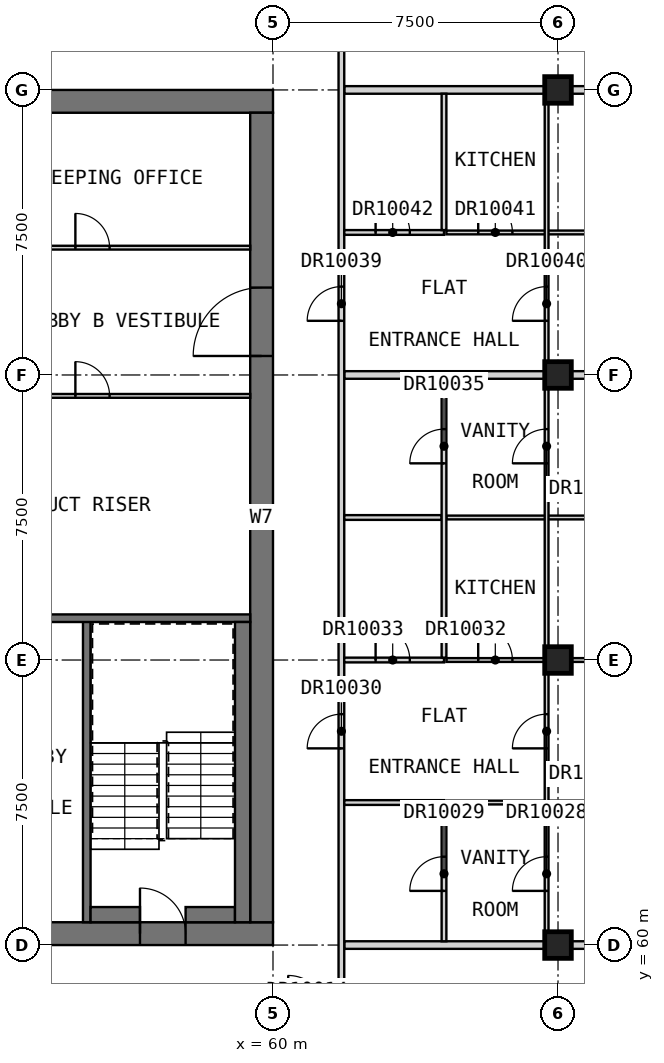
"""IFC4 building model, lengths in metres.
Left out: names, types, materials, properties, quantities, classifications, styles, units other than length and angle.
Written with IfcOpenShell. Run it as: python <this file> out.ifc"""

import sys

from ifc_helpers import new_model, si_unit, direction, frame, frame_2d, origin, origin_2d, place, context, subcontext, project, spatial, rectangle, extrude, element, fill, save


model = new_model("IFC4")
c1 = context("Model", 3, precision=1e-05, world=origin(), true_north=direction((0.0, 1.0)))
c2 = subcontext(c1, "Body", "Model", "MODEL_VIEW")
j1 = project(units=[si_unit("LENGTHUNIT", "METRE"), si_unit("PLANEANGLEUNIT", "RADIAN")], contexts=[c1])
p1 = place(None, origin())
s1 = spatial("IfcSite", under=j1, at=p1, CompositionType="ELEMENT")
p2 = place(p1, origin())
s2 = spatial("IfcBuilding", under=s1, at=p2, CompositionType="ELEMENT")
p3 = place(p2, frame((0.0, 0.0, 273.2)))
s3 = spatial("IfcBuildingStorey", under=s2, at=p3, CompositionType="ELEMENT", Elevation=273.2)
for number, where, z_axis, x_axis in (
    (1, (67.5, 60.0, 0.0), (0.0, 0.0, 1.0), (1.0, 0.0, 0.0)),
    (2, (67.5, 67.5, 0.0), (0.0, 0.0, 1.0), (1.0, 0.0, 0.0)),
    (3, (67.5, 75.0, 0.0), (0.0, 0.0, 1.0), (1.0, 0.0, 0.0)),
    (4, (67.5, 82.5, 0.0), (0.0, 0.0, 1.0), (1.0, 0.0, 0.0)),
):
    element("IfcColumn", number, at=place(p3, frame(where, z_axis=z_axis, x_axis=x_axis)), inside=s3, PredefinedType="COLUMN", context=c2, shape_type="SweptSolid", body=[
        extrude(rectangle(XDim=0.7, YDim=0.7, at=origin_2d()), origin(), (0.0, 0.0, 1.0), 3.5),
    ])
p4 = place(p3, frame((30.0, 60.3, 0.0), z_axis=(0.0, 0.0, 1.0), x_axis=(1.0, 0.0, 0.0)))
e5 = element("IfcWall", 5, at=p4, inside=s3, PredefinedType="SHEAR", context=c2, shape_type="SweptSolid", body=[
    extrude(rectangle(XDim=30.0, YDim=0.6, at=frame_2d((15.0, 0.0))), origin(), (0.0, 0.0, 1.0), 3.5),
])
p5 = place(p4, frame((21.9, 0.0, 0.0)))
e6 = element("IfcOpeningElement", 6, at=p5, cuts=e5, PredefinedType="OPENING", context=c2, shape_type="SweptSolid", body=[
    extrude(rectangle(XDim=1.8, YDim=2.1, at=frame_2d((0.9, 1.05))), frame((0.0, 0.31, 0.0), z_axis=(0.0, -1.0, 0.0), x_axis=(1.0, 0.0, 0.0)), (0.0, 0.0, 1.0), 0.62),
])
p6 = place(p4, frame((26.5, 0.0, 0.0)))
e7 = element("IfcOpeningElement", 7, at=p6, cuts=e5, PredefinedType="OPENING", context=c2, shape_type="SweptSolid", body=[
    extrude(rectangle(XDim=1.2, YDim=2.1, at=frame_2d((0.6, 1.05))), frame((0.0, 0.31, 0.0), z_axis=(0.0, -1.0, 0.0), x_axis=(1.0, 0.0, 0.0)), (0.0, 0.0, 1.0), 0.62),
])
p7 = place(p3, frame((30.0, 82.2, 0.0), z_axis=(0.0, 0.0, 1.0), x_axis=(1.0, 0.0, 0.0)))
e8 = element("IfcWall", 8, at=p7, inside=s3, PredefinedType="SHEAR", context=c2, shape_type="SweptSolid", body=[
    extrude(rectangle(XDim=30.0, YDim=0.6, at=frame_2d((15.0, 0.0))), origin(), (0.0, 0.0, 1.0), 3.5),
])
p8 = place(p3, frame((59.7, 60.6, 0.0), z_axis=(0.0, 0.0, 1.0), x_axis=(0.0, 1.0, 0.0)))
e9 = element("IfcWall", 9, at=p8, inside=s3, PredefinedType="SHEAR", context=c2, shape_type="SweptSolid", body=[
    extrude(rectangle(XDim=21.3, YDim=0.6, at=frame_2d((10.65, 0.0))), origin(), (0.0, 0.0, 1.0), 3.5),
])
p9 = place(p8, frame((14.9, 0.0, 0.0)))
e10 = element("IfcOpeningElement", 10, at=p9, cuts=e9, PredefinedType="OPENING", context=c2, shape_type="SweptSolid", body=[
    extrude(rectangle(XDim=1.8, YDim=2.1, at=frame_2d((0.9, 1.05))), frame((0.0, 0.31, 0.0), z_axis=(0.0, -1.0, 0.0), x_axis=(1.0, 0.0, 0.0)), (0.0, 0.0, 1.0), 0.62),
])
p10 = place(p3, frame((55.1, 60.6, 0.0), z_axis=(0.0, 0.0, 1.0), x_axis=(0.0, 1.0, 0.0)))
e11 = element("IfcWall", 11, at=p10, inside=s3, PredefinedType="SOLIDWALL", context=c2, shape_type="SweptSolid", body=[
    extrude(rectangle(XDim=8.0, YDim=0.2, at=frame_2d((4.0, 0.0))), origin(), (0.0, 0.0, 1.0), 3.25),
])
p11 = place(p3, frame((51.1, 68.6, 0.0), z_axis=(0.0, 0.0, 1.0), x_axis=(1.0, 0.0, 0.0)))
e12 = element("IfcWall", 12, at=p11, inside=s3, PredefinedType="SOLIDWALL", context=c2, shape_type="SweptSolid", body=[
    extrude(rectangle(XDim=8.3, YDim=0.2, at=frame_2d((4.15, 0.0))), origin(), (0.0, 0.0, 1.0), 3.25),
])
for number, where, z_axis, x_axis in (
    (13, (55.2, 60.8, 0.0), (0.0, 0.0, 1.0), (1.0, 0.0, 0.0)),
    (14, (57.7, 60.8, 0.0), (0.0, 0.0, 1.0), (1.0, 0.0, 0.0)),
):
    element("IfcWall", number, at=place(p3, frame(where, z_axis=z_axis, x_axis=x_axis)), inside=s3, PredefinedType="SOLIDWALL", context=c2, shape_type="SweptSolid", body=[
        extrude(rectangle(XDim=1.3, YDim=0.4, at=frame_2d((0.65, 0.0))), origin(), (0.0, 0.0, 1.0), 3.25),
    ])
p12 = place(p3, frame((59.2, 60.6, 0.0), z_axis=(0.0, 0.0, 1.0), x_axis=(0.0, 1.0, 0.0)))
e15 = element("IfcWall", 15, at=p12, inside=s3, PredefinedType="SOLIDWALL", context=c2, shape_type="SweptSolid", body=[
    extrude(rectangle(XDim=7.9, YDim=0.4, at=frame_2d((3.95, 0.0))), origin(), (0.0, 0.0, 1.0), 3.25),
])
p13 = place(p3, frame((51.1, 74.45, 0.0), z_axis=(0.0, 0.0, 1.0), x_axis=(1.0, 0.0, 0.0)))
e16 = element("IfcWall", 16, at=p13, inside=s3, PredefinedType="PARTITIONING", context=c2, shape_type="SweptSolid", body=[
    extrude(rectangle(XDim=8.3, YDim=0.1, at=frame_2d((4.15, 0.0))), origin(), (0.0, 0.0, 1.0), 3.25),
])
p14 = place(p13, frame((3.7, 0.0, 0.0)))
e17 = element("IfcOpeningElement", 17, at=p14, cuts=e16, PredefinedType="OPENING", context=c2, shape_type="SweptSolid", body=[
    extrude(rectangle(XDim=0.9, YDim=2.1, at=frame_2d((0.45, 1.05))), frame((0.0, 0.06, 0.0), z_axis=(0.0, -1.0, 0.0), x_axis=(1.0, 0.0, 0.0)), (0.0, 0.0, 1.0), 0.12),
])
p15 = place(p3, frame((51.1, 78.35, 0.0), z_axis=(0.0, 0.0, 1.0), x_axis=(1.0, 0.0, 0.0)))
e18 = element("IfcWall", 18, at=p15, inside=s3, PredefinedType="PARTITIONING", context=c2, shape_type="SweptSolid", body=[
    extrude(rectangle(XDim=8.3, YDim=0.1, at=frame_2d((4.15, 0.0))), origin(), (0.0, 0.0, 1.0), 3.25),
])
p16 = place(p15, frame((3.7, 0.0, 0.0)))
e19 = element("IfcOpeningElement", 19, at=p16, cuts=e18, PredefinedType="OPENING", context=c2, shape_type="SweptSolid", body=[
    extrude(rectangle(XDim=0.9, YDim=2.1, at=frame_2d((0.45, 1.05))), frame((0.0, 0.06, 0.0), z_axis=(0.0, -1.0, 0.0), x_axis=(1.0, 0.0, 0.0)), (0.0, 0.0, 1.0), 0.12),
])
for number, where, z_axis, x_axis in (
    (20, (61.875, 60.0, 0.0), (0.0, 0.0, 1.0), (1.0, 0.0, 0.0)),
    (21, (61.875, 75.0, 0.0), (0.0, 0.0, 1.0), (1.0, 0.0, 0.0)),
    (22, (61.875, 82.5, 0.0), (0.0, 0.0, 1.0), (1.0, 0.0, 0.0)),
):
    element("IfcWall", number, at=place(p3, frame(where, z_axis=z_axis, x_axis=x_axis)), inside=s3, PredefinedType="PARTITIONING", context=c2, shape_type="SweptSolid", body=[
        extrude(rectangle(XDim=13.125, YDim=0.2, at=frame_2d((6.562, 0.0))), origin(), (0.0, 0.0, 1.0), 3.25),
    ])
p17 = place(p3, frame((61.8, 58.275, 0.0), z_axis=(0.0, 0.0, 1.0), x_axis=(0.0, 1.0, 0.0)))
e23 = element("IfcWall", 23, at=p17, inside=s3, PredefinedType="PARTITIONING", context=c2, shape_type="SweptSolid", body=[
    extrude(rectangle(XDim=25.95, YDim=0.15, at=frame_2d((12.975, 0.0))), origin(), (0.0, 0.0, 1.0), 3.25),
])
p18 = place(p17, frame((6.9, 0.0, 0.0)))
e24 = element("IfcOpeningElement", 24, at=p18, cuts=e23, PredefinedType="OPENING", context=c2, shape_type="SweptSolid", body=[
    extrude(rectangle(XDim=0.9, YDim=2.1, at=frame_2d((0.45, 1.05))), frame((0.0, 0.085, 0.0), z_axis=(0.0, -1.0, 0.0), x_axis=(1.0, 0.0, 0.0)), (0.0, 0.0, 1.0), 0.17),
])
p19 = place(p17, frame((18.15, 0.0, 0.0)))
e25 = element("IfcOpeningElement", 25, at=p19, cuts=e23, PredefinedType="OPENING", context=c2, shape_type="SweptSolid", body=[
    extrude(rectangle(XDim=0.9, YDim=2.1, at=frame_2d((0.45, 1.05))), frame((0.0, 0.085, 0.0), z_axis=(0.0, -1.0, 0.0), x_axis=(1.0, 0.0, 0.0)), (0.0, 0.0, 1.0), 0.17),
])
p20 = place(p3, frame((64.562, 63.75, 0.0), z_axis=(0.0, 0.0, 1.0), x_axis=(1.0, 0.0, 0.0)))
e26 = element("IfcWall", 26, at=p20, inside=s3, PredefinedType="PARTITIONING", context=c2, shape_type="SweptSolid", body=[
    extrude(rectangle(XDim=9.627, YDim=0.1, at=frame_2d((4.814, 0.0))), origin(), (0.0, 0.0, 1.0), 3.25),
])
p21 = place(p20, frame((6.087, 0.0, 0.0)))
e27 = element("IfcOpeningElement", 27, at=p21, cuts=e26, PredefinedType="OPENING", context=c2, shape_type="SweptSolid", body=[
    extrude(rectangle(XDim=0.9, YDim=2.1, at=frame_2d((0.45, 1.05))), frame((0.0, 0.06, 0.0), z_axis=(0.0, -1.0, 0.0), x_axis=(1.0, 0.0, 0.0)), (0.0, 0.0, 1.0), 0.12),
])
p22 = place(p3, frame((64.562, 67.5, 0.0), z_axis=(0.0, 0.0, 1.0), x_axis=(1.0, 0.0, 0.0)))
e28 = element("IfcWall", 28, at=p22, inside=s3, PredefinedType="PARTITIONING", context=c2, shape_type="SweptSolid", body=[
    extrude(rectangle(XDim=10.438, YDim=0.1, at=frame_2d((5.219, 0.0))), origin(), (0.0, 0.0, 1.0), 3.25),
])
p23 = place(p22, frame((0.837, 0.0, 0.0)))
e29 = element("IfcOpeningElement", 29, at=p23, cuts=e28, PredefinedType="OPENING", context=c2, shape_type="SweptSolid", body=[
    extrude(rectangle(XDim=0.9, YDim=2.1, at=frame_2d((0.45, 1.05))), frame((0.0, 0.06, 0.0), z_axis=(0.0, -1.0, 0.0), x_axis=(1.0, 0.0, 0.0)), (0.0, 0.0, 1.0), 0.12),
])
p24 = place(p22, frame((6.087, 0.0, 0.0)))
e30 = element("IfcOpeningElement", 30, at=p24, cuts=e28, PredefinedType="OPENING", context=c2, shape_type="SweptSolid", body=[
    extrude(rectangle(XDim=0.9, YDim=2.1, at=frame_2d((0.45, 1.05))), frame((0.0, 0.06, 0.0), z_axis=(0.0, -1.0, 0.0), x_axis=(1.0, 0.0, 0.0)), (0.0, 0.0, 1.0), 0.12),
])
p25 = place(p3, frame((64.562, 71.25, 0.0), z_axis=(0.0, 0.0, 1.0), x_axis=(1.0, 0.0, 0.0)))
e31 = element("IfcWall", 31, at=p25, inside=s3, PredefinedType="PARTITIONING", context=c2, shape_type="SweptSolid", body=[
    extrude(rectangle(XDim=9.627, YDim=0.1, at=frame_2d((4.814, 0.0))), origin(), (0.0, 0.0, 1.0), 3.25),
])
p26 = place(p25, frame((6.087, 0.0, 0.0)))
e32 = element("IfcOpeningElement", 32, at=p26, cuts=e31, PredefinedType="OPENING", context=c2, shape_type="SweptSolid", body=[
    extrude(rectangle(XDim=0.9, YDim=2.1, at=frame_2d((0.45, 1.05))), frame((0.0, 0.06, 0.0), z_axis=(0.0, -1.0, 0.0), x_axis=(1.0, 0.0, 0.0)), (0.0, 0.0, 1.0), 0.12),
])
p27 = place(p3, frame((64.562, 78.75, 0.0), z_axis=(0.0, 0.0, 1.0), x_axis=(1.0, 0.0, 0.0)))
e33 = element("IfcWall", 33, at=p27, inside=s3, PredefinedType="PARTITIONING", context=c2, shape_type="SweptSolid", body=[
    extrude(rectangle(XDim=9.627, YDim=0.1, at=frame_2d((4.814, 0.0))), origin(), (0.0, 0.0, 1.0), 3.25),
])
p28 = place(p27, frame((0.837, 0.0, 0.0)))
e34 = element("IfcOpeningElement", 34, at=p28, cuts=e33, PredefinedType="OPENING", context=c2, shape_type="SweptSolid", body=[
    extrude(rectangle(XDim=0.9, YDim=2.1, at=frame_2d((0.45, 1.05))), frame((0.0, 0.06, 0.0), z_axis=(0.0, -1.0, 0.0), x_axis=(1.0, 0.0, 0.0)), (0.0, 0.0, 1.0), 0.12),
])
p29 = place(p27, frame((6.087, 0.0, 0.0)))
e35 = element("IfcOpeningElement", 35, at=p29, cuts=e33, PredefinedType="OPENING", context=c2, shape_type="SweptSolid", body=[
    extrude(rectangle(XDim=0.9, YDim=2.1, at=frame_2d((0.45, 1.05))), frame((0.0, 0.06, 0.0), z_axis=(0.0, -1.0, 0.0), x_axis=(1.0, 0.0, 0.0)), (0.0, 0.0, 1.0), 0.12),
])
p30 = place(p3, frame((67.2, 60.1, 0.0), z_axis=(0.0, 0.0, 1.0), x_axis=(0.0, 1.0, 0.0)))
e36 = element("IfcWall", 36, at=p30, inside=s3, PredefinedType="PARTITIONING", context=c2, shape_type="SweptSolid", body=[
    extrude(rectangle(XDim=22.3, YDim=0.1, at=frame_2d((11.15, 0.0))), origin(), (0.0, 0.0, 1.0), 3.25),
])
p31 = place(p30, frame((1.325, 0.0, 0.0)))
e37 = element("IfcOpeningElement", 37, at=p31, cuts=e36, PredefinedType="OPENING", context=c2, shape_type="SweptSolid", body=[
    extrude(rectangle(XDim=0.9, YDim=2.1, at=frame_2d((0.45, 1.05))), frame((0.0, 0.06, 0.0), z_axis=(0.0, -1.0, 0.0), x_axis=(1.0, 0.0, 0.0)), (0.0, 0.0, 1.0), 0.12),
])
p32 = place(p30, frame((5.075, 0.0, 0.0)))
e38 = element("IfcOpeningElement", 38, at=p32, cuts=e36, PredefinedType="OPENING", context=c2, shape_type="SweptSolid", body=[
    extrude(rectangle(XDim=0.9, YDim=2.1, at=frame_2d((0.45, 1.05))), frame((0.0, 0.06, 0.0), z_axis=(0.0, -1.0, 0.0), x_axis=(1.0, 0.0, 0.0)), (0.0, 0.0, 1.0), 0.12),
])
p33 = place(p30, frame((12.575, 0.0, 0.0)))
e39 = element("IfcOpeningElement", 39, at=p33, cuts=e36, PredefinedType="OPENING", context=c2, shape_type="SweptSolid", body=[
    extrude(rectangle(XDim=0.9, YDim=2.1, at=frame_2d((0.45, 1.05))), frame((0.0, 0.06, 0.0), z_axis=(0.0, -1.0, 0.0), x_axis=(1.0, 0.0, 0.0)), (0.0, 0.0, 1.0), 0.12),
])
p34 = place(p30, frame((16.325, 0.0, 0.0)))
e40 = element("IfcOpeningElement", 40, at=p34, cuts=e36, PredefinedType="OPENING", context=c2, shape_type="SweptSolid", body=[
    extrude(rectangle(XDim=0.9, YDim=2.1, at=frame_2d((0.45, 1.05))), frame((0.0, 0.06, 0.0), z_axis=(0.0, -1.0, 0.0), x_axis=(1.0, 0.0, 0.0)), (0.0, 0.0, 1.0), 0.12),
])
p35 = place(p3, frame((61.875, 63.75, 0.0), z_axis=(0.0, 0.0, 1.0), x_axis=(1.0, 0.0, 0.0)))
e41 = element("IfcWall", 41, at=p35, inside=s3, PredefinedType="PARTITIONING", context=c2, shape_type="SweptSolid", body=[
    extrude(rectangle(XDim=2.625, YDim=0.125, at=frame_2d((1.312, 0.0))), origin(), (0.0, 0.0, 1.0), 3.25),
])
p36 = place(p3, frame((61.875, 67.5, 0.0), z_axis=(0.0, 0.0, 1.0), x_axis=(1.0, 0.0, 0.0)))
e42 = element("IfcWall", 42, at=p36, inside=s3, PredefinedType="PARTITIONING", context=c2, shape_type="SweptSolid", body=[
    extrude(rectangle(XDim=2.625, YDim=0.125, at=frame_2d((1.312, 0.0))), origin(), (0.0, 0.0, 1.0), 3.25),
])
p37 = place(p36, frame((0.825, 0.0, 0.0)))
e43 = element("IfcOpeningElement", 43, at=p37, cuts=e42, PredefinedType="OPENING", context=c2, shape_type="SweptSolid", body=[
    extrude(rectangle(XDim=0.9, YDim=2.1, at=frame_2d((0.45, 1.05))), frame((0.0, 0.073, 0.0), z_axis=(0.0, -1.0, 0.0), x_axis=(1.0, 0.0, 0.0)), (0.0, 0.0, 1.0), 0.145),
])
p38 = place(p3, frame((61.875, 71.25, 0.0), z_axis=(0.0, 0.0, 1.0), x_axis=(1.0, 0.0, 0.0)))
e44 = element("IfcWall", 44, at=p38, inside=s3, PredefinedType="PARTITIONING", context=c2, shape_type="SweptSolid", body=[
    extrude(rectangle(XDim=2.562, YDim=0.125, at=frame_2d((1.281, 0.0))), origin(), (0.0, 0.0, 1.0), 3.25),
])
p39 = place(p3, frame((61.875, 78.75, 0.0), z_axis=(0.0, 0.0, 1.0), x_axis=(1.0, 0.0, 0.0)))
e45 = element("IfcWall", 45, at=p39, inside=s3, PredefinedType="PARTITIONING", context=c2, shape_type="SweptSolid", body=[
    extrude(rectangle(XDim=2.625, YDim=0.125, at=frame_2d((1.312, 0.0))), origin(), (0.0, 0.0, 1.0), 3.25),
])
p40 = place(p39, frame((0.825, 0.0, 0.0)))
e46 = element("IfcOpeningElement", 46, at=p40, cuts=e45, PredefinedType="OPENING", context=c2, shape_type="SweptSolid", body=[
    extrude(rectangle(XDim=0.9, YDim=2.1, at=frame_2d((0.45, 1.05))), frame((0.0, 0.073, 0.0), z_axis=(0.0, -1.0, 0.0), x_axis=(1.0, 0.0, 0.0)), (0.0, 0.0, 1.0), 0.145),
])
p41 = place(p3, frame((64.5, 60.1, 0.0), z_axis=(0.0, 0.0, 1.0), x_axis=(0.0, 1.0, 0.0)))
e47 = element("IfcWall", 47, at=p41, inside=s3, PredefinedType="PARTITIONING", context=c2, shape_type="SweptSolid", body=[
    extrude(rectangle(XDim=3.587, YDim=0.125, at=frame_2d((1.794, 0.0))), origin(), (0.0, 0.0, 1.0), 3.25),
])
p42 = place(p41, frame((1.325, 0.0, 0.0)))
e48 = element("IfcOpeningElement", 48, at=p42, cuts=e47, PredefinedType="OPENING", context=c2, shape_type="SweptSolid", body=[
    extrude(rectangle(XDim=0.9, YDim=2.1, at=frame_2d((0.45, 1.05))), frame((0.0, 0.073, 0.0), z_axis=(0.0, -1.0, 0.0), x_axis=(1.0, 0.0, 0.0)), (0.0, 0.0, 1.0), 0.145),
])
p43 = place(p3, frame((64.5, 67.562, 0.0), z_axis=(0.0, 0.0, 1.0), x_axis=(0.0, 1.0, 0.0)))
e49 = element("IfcWall", 49, at=p43, inside=s3, PredefinedType="PARTITIONING", context=c2, shape_type="SweptSolid", body=[
    extrude(rectangle(XDim=7.337, YDim=0.125, at=frame_2d((3.669, 0.0))), origin(), (0.0, 0.0, 1.0), 3.25),
])
p44 = place(p43, frame((5.113, 0.0, 0.0)))
e50 = element("IfcOpeningElement", 50, at=p44, cuts=e49, PredefinedType="OPENING", context=c2, shape_type="SweptSolid", body=[
    extrude(rectangle(XDim=0.9, YDim=2.1, at=frame_2d((0.45, 1.05))), frame((0.0, 0.073, 0.0), z_axis=(0.0, -1.0, 0.0), x_axis=(1.0, 0.0, 0.0)), (0.0, 0.0, 1.0), 0.145),
])
p45 = place(p3, frame((64.5, 78.812, 0.0), z_axis=(0.0, 0.0, 1.0), x_axis=(0.0, 1.0, 0.0)))
e51 = element("IfcWall", 51, at=p45, inside=s3, PredefinedType="PARTITIONING", context=c2, shape_type="SweptSolid", body=[
    extrude(rectangle(XDim=3.587, YDim=0.125, at=frame_2d((1.794, 0.0))), origin(), (0.0, 0.0, 1.0), 3.25),
])
p46 = place(p9, origin())
e52 = element("IfcDoor", 52, at=p46, inside=s3, OperationType="DOUBLE_DOOR_SINGLE_SWING", PredefinedType="DOOR", context=c2, shape_type="SweptSolid", body=[
    extrude(rectangle(XDim=1.8, YDim=2.1, at=frame_2d((0.9, 1.05))), frame((0.0, 0.025, 0.0), z_axis=(0.0, -1.0, 0.0), x_axis=(1.0, 0.0, 0.0)), (0.0, 0.0, 1.0), 0.05),
])
fill(e10, e52)
p47 = place(p6, origin())
e53 = element("IfcDoor", 53, at=p47, inside=s3, OperationType="SINGLE_SWING_LEFT", PredefinedType="DOOR", context=c2, shape_type="SweptSolid", body=[
    extrude(rectangle(XDim=1.2, YDim=2.1, at=frame_2d((0.6, 1.05))), frame((0.0, 0.025, 0.0), z_axis=(0.0, -1.0, 0.0), x_axis=(1.0, 0.0, 0.0)), (0.0, 0.0, 1.0), 0.05),
])
fill(e7, e53)
p48 = place(p14, origin())
e54 = element("IfcDoor", 54, at=p48, inside=s3, OperationType="SINGLE_SWING_RIGHT", PredefinedType="DOOR", context=c2, shape_type="SweptSolid", body=[
    extrude(rectangle(XDim=0.9, YDim=2.1, at=frame_2d((0.45, 1.05))), frame((0.0, 0.025, 0.0), z_axis=(0.0, -1.0, 0.0), x_axis=(1.0, 0.0, 0.0)), (0.0, 0.0, 1.0), 0.05),
])
fill(e17, e54)
p49 = place(p16, origin())
e55 = element("IfcDoor", 55, at=p49, inside=s3, OperationType="SINGLE_SWING_RIGHT", PredefinedType="DOOR", context=c2, shape_type="SweptSolid", body=[
    extrude(rectangle(XDim=0.9, YDim=2.1, at=frame_2d((0.45, 1.05))), frame((0.0, 0.025, 0.0), z_axis=(0.0, -1.0, 0.0), x_axis=(1.0, 0.0, 0.0)), (0.0, 0.0, 1.0), 0.05),
])
fill(e19, e55)
p50 = place(p31, origin())
e56 = element("IfcDoor", 56, at=p50, inside=s3, OperationType="SINGLE_SWING_LEFT", PredefinedType="DOOR", context=c2, shape_type="SweptSolid", body=[
    extrude(rectangle(XDim=0.9, YDim=2.1, at=frame_2d((0.45, 1.05))), frame((0.0, 0.025, 0.0), z_axis=(0.0, -1.0, 0.0), x_axis=(1.0, 0.0, 0.0)), (0.0, 0.0, 1.0), 0.05),
])
fill(e37, e56)
p51 = place(p42, origin())
e57 = element("IfcDoor", 57, at=p51, inside=s3, OperationType="SINGLE_SWING_LEFT", PredefinedType="DOOR", context=c2, shape_type="SweptSolid", body=[
    extrude(rectangle(XDim=0.9, YDim=2.1, at=frame_2d((0.45, 1.05))), frame((0.0, 0.025, 0.0), z_axis=(0.0, -1.0, 0.0), x_axis=(1.0, 0.0, 0.0)), (0.0, 0.0, 1.0), 0.05),
])
fill(e48, e57)
p52 = place(p18, origin())
e58 = element("IfcDoor", 58, at=p52, inside=s3, OperationType="SINGLE_SWING_RIGHT", PredefinedType="DOOR", context=c2, shape_type="SweptSolid", body=[
    extrude(rectangle(XDim=0.9, YDim=2.1, at=frame_2d((0.45, 1.05))), frame((0.0, 0.025, 0.0), z_axis=(0.0, -1.0, 0.0), x_axis=(1.0, 0.0, 0.0)), (0.0, 0.0, 1.0), 0.05),
])
fill(e24, e58)
p53 = place(p32, origin())
e59 = element("IfcDoor", 59, at=p53, inside=s3, OperationType="SINGLE_SWING_LEFT", PredefinedType="DOOR", context=c2, shape_type="SweptSolid", body=[
    extrude(rectangle(XDim=0.9, YDim=2.1, at=frame_2d((0.45, 1.05))), frame((0.0, 0.025, 0.0), z_axis=(0.0, -1.0, 0.0), x_axis=(1.0, 0.0, 0.0)), (0.0, 0.0, 1.0), 0.05),
])
fill(e38, e59)
p54 = place(p23, origin())
e60 = element("IfcDoor", 60, at=p54, inside=s3, OperationType="SINGLE_SWING_LEFT", PredefinedType="DOOR", context=c2, shape_type="SweptSolid", body=[
    extrude(rectangle(XDim=0.9, YDim=2.1, at=frame_2d((0.45, 1.05))), frame((0.0, 0.025, 0.0), z_axis=(0.0, -1.0, 0.0), x_axis=(1.0, 0.0, 0.0)), (0.0, 0.0, 1.0), 0.05),
])
fill(e29, e60)
p55 = place(p37, origin())
e61 = element("IfcDoor", 61, at=p55, inside=s3, OperationType="SINGLE_SWING_LEFT", PredefinedType="DOOR", context=c2, shape_type="SweptSolid", body=[
    extrude(rectangle(XDim=0.9, YDim=2.1, at=frame_2d((0.45, 1.05))), frame((0.0, 0.025, 0.0), z_axis=(0.0, -1.0, 0.0), x_axis=(1.0, 0.0, 0.0)), (0.0, 0.0, 1.0), 0.05),
])
fill(e43, e61)
p56 = place(p33, origin())
e62 = element("IfcDoor", 62, at=p56, inside=s3, OperationType="SINGLE_SWING_LEFT", PredefinedType="DOOR", context=c2, shape_type="SweptSolid", body=[
    extrude(rectangle(XDim=0.9, YDim=2.1, at=frame_2d((0.45, 1.05))), frame((0.0, 0.025, 0.0), z_axis=(0.0, -1.0, 0.0), x_axis=(1.0, 0.0, 0.0)), (0.0, 0.0, 1.0), 0.05),
])
fill(e39, e62)
p57 = place(p44, origin())
e63 = element("IfcDoor", 63, at=p57, inside=s3, OperationType="SINGLE_SWING_LEFT", PredefinedType="DOOR", context=c2, shape_type="SweptSolid", body=[
    extrude(rectangle(XDim=0.9, YDim=2.1, at=frame_2d((0.45, 1.05))), frame((0.0, 0.025, 0.0), z_axis=(0.0, -1.0, 0.0), x_axis=(1.0, 0.0, 0.0)), (0.0, 0.0, 1.0), 0.05),
])
fill(e50, e63)
p58 = place(p19, origin())
e64 = element("IfcDoor", 64, at=p58, inside=s3, OperationType="SINGLE_SWING_RIGHT", PredefinedType="DOOR", context=c2, shape_type="SweptSolid", body=[
    extrude(rectangle(XDim=0.9, YDim=2.1, at=frame_2d((0.45, 1.05))), frame((0.0, 0.025, 0.0), z_axis=(0.0, -1.0, 0.0), x_axis=(1.0, 0.0, 0.0)), (0.0, 0.0, 1.0), 0.05),
])
fill(e25, e64)
p59 = place(p34, origin())
e65 = element("IfcDoor", 65, at=p59, inside=s3, OperationType="SINGLE_SWING_LEFT", PredefinedType="DOOR", context=c2, shape_type="SweptSolid", body=[
    extrude(rectangle(XDim=0.9, YDim=2.1, at=frame_2d((0.45, 1.05))), frame((0.0, 0.025, 0.0), z_axis=(0.0, -1.0, 0.0), x_axis=(1.0, 0.0, 0.0)), (0.0, 0.0, 1.0), 0.05),
])
fill(e40, e65)
p60 = place(p28, origin())
e66 = element("IfcDoor", 66, at=p60, inside=s3, OperationType="SINGLE_SWING_LEFT", PredefinedType="DOOR", context=c2, shape_type="SweptSolid", body=[
    extrude(rectangle(XDim=0.9, YDim=2.1, at=frame_2d((0.45, 1.05))), frame((0.0, 0.025, 0.0), z_axis=(0.0, -1.0, 0.0), x_axis=(1.0, 0.0, 0.0)), (0.0, 0.0, 1.0), 0.05),
])
fill(e34, e66)
p61 = place(p40, origin())
e67 = element("IfcDoor", 67, at=p61, inside=s3, OperationType="SINGLE_SWING_LEFT", PredefinedType="DOOR", context=c2, shape_type="SweptSolid", body=[
    extrude(rectangle(XDim=0.9, YDim=2.1, at=frame_2d((0.45, 1.05))), frame((0.0, 0.025, 0.0), z_axis=(0.0, -1.0, 0.0), x_axis=(1.0, 0.0, 0.0)), (0.0, 0.0, 1.0), 0.05),
])
fill(e46, e67)
save(model, sys.argv[1])
